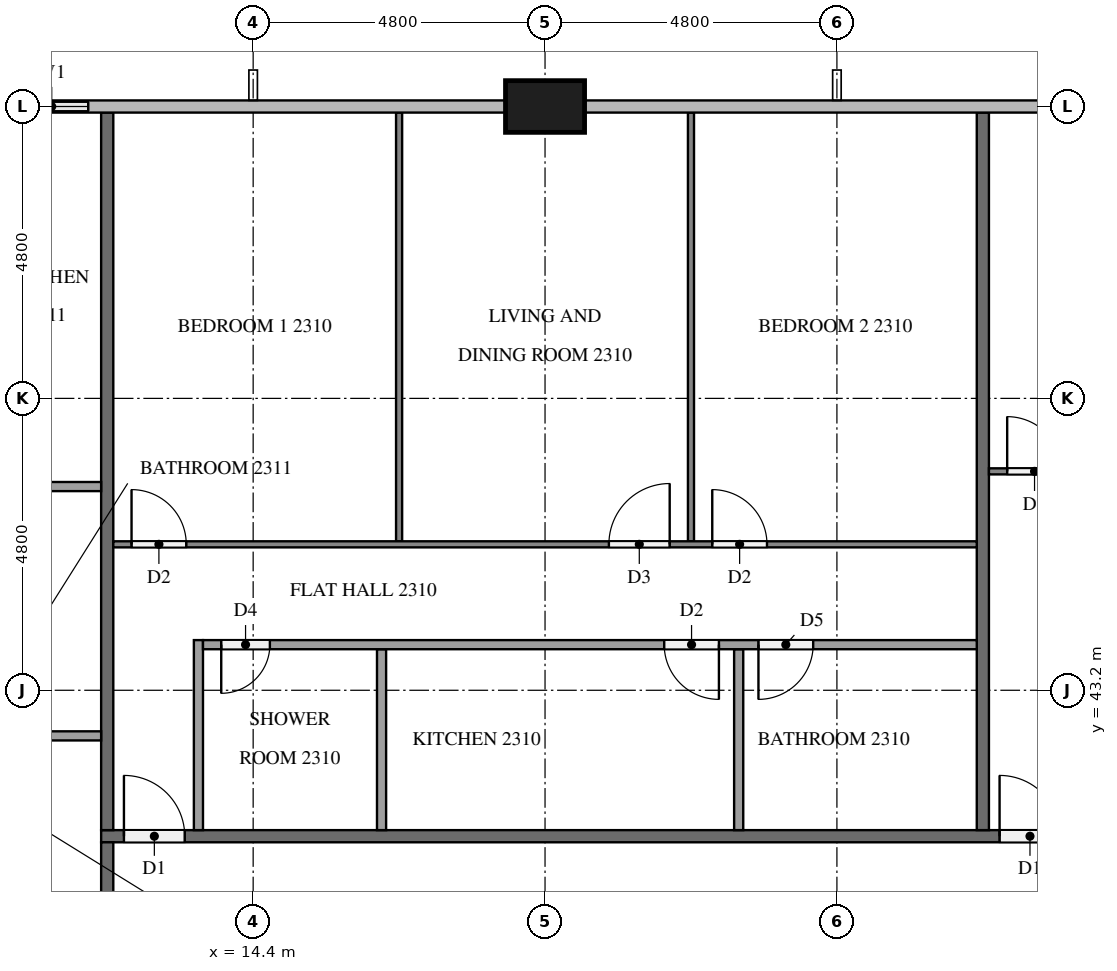
"""IFC4 building model, lengths in metres.
Left out: names, types, materials, properties, quantities, classifications, styles, units other than length and angle.
Written with IfcOpenShell. Run it as: python <this file> out.ifc"""

import sys

from ifc_helpers import new_model, si_unit, direction, frame, frame_2d, origin, origin_2d, place, context, subcontext, project, spatial, rectangle, extrude, element, fill, save


model = new_model("IFC4")
c1 = context("Model", 3, precision=1e-05, world=origin(), true_north=direction((0.0, 1.0)))
c2 = subcontext(c1, "Body", "Model", "MODEL_VIEW")
j1 = project(units=[si_unit("LENGTHUNIT", "METRE"), si_unit("PLANEANGLEUNIT", "RADIAN")], contexts=[c1])
p1 = place(None, origin())
s1 = spatial("IfcSite", under=j1, at=p1, CompositionType="ELEMENT")
p2 = place(p1, origin())
s2 = spatial("IfcBuilding", under=s1, at=p2, CompositionType="ELEMENT")
p3 = place(p2, frame((0.0, 0.0, 92.7)))
s3 = spatial("IfcBuildingStorey", under=s2, at=p3, CompositionType="ELEMENT", Elevation=92.7)
p4 = place(p3, frame((19.2, 52.8, 0.0), z_axis=(0.0, 0.0, 1.0), x_axis=(1.0, 0.0, 0.0)))
e1 = element("IfcColumn", 1, at=p4, inside=s3, PredefinedType="COLUMN", context=c2, shape_type="SweptSolid", body=[
    extrude(rectangle(XDim=1.3, YDim=0.85, at=origin_2d()), origin(), (0.0, 0.0, 1.0), 3.2),
])
p5 = place(p3, frame((12.0, 52.8, 0.0), z_axis=(0.0, 0.0, 1.0), x_axis=(-1.0, 0.0, 0.0)))
e2 = element("IfcWall", 2, at=p5, inside=s3, PredefinedType="SOLIDWALL", context=c2, shape_type="SweptSolid", body=[
    extrude(rectangle(XDim=1.825, YDim=0.15, at=frame_2d((0.913, 0.0))), origin(), (0.0, 0.0, 1.0), 3.2),
])
p6 = place(p5, frame((0.312, 0.0, 0.9)))
e3 = element("IfcOpeningElement", 3, at=p6, cuts=e2, PredefinedType="OPENING", context=c2, shape_type="SweptSolid", body=[
    extrude(rectangle(XDim=1.2, YDim=1.4, at=frame_2d((0.6, 0.7))), frame((0.0, 0.085, 0.0), z_axis=(0.0, -1.0, 0.0), x_axis=(1.0, 0.0, 0.0)), (0.0, 0.0, 1.0), 0.17),
])
p7 = place(p3, frame((11.9, 40.8, 0.0), z_axis=(0.0, 0.0, 1.0), x_axis=(1.0, 0.0, 0.0)))
e4 = element("IfcWall", 4, at=p7, inside=s3, PredefinedType="PARTITIONING", context=c2, shape_type="SweptSolid", body=[
    extrude(rectangle(XDim=38.6, YDim=0.2, at=frame_2d((19.3, 0.0))), origin(), (0.0, 0.0, 1.0), 3.2),
])
p8 = place(p7, frame((31.575, 0.0, 0.0)))
e5 = element("IfcOpeningElement", 5, at=p8, cuts=e4, PredefinedType="OPENING", context=c2, shape_type="SweptSolid", body=[
    extrude(rectangle(XDim=1.0, YDim=2.1, at=frame_2d((0.5, 1.05))), frame((0.0, 0.11, 0.0), z_axis=(0.0, -1.0, 0.0), x_axis=(1.0, 0.0, 0.0)), (0.0, 0.0, 1.0), 0.22),
])
p9 = place(p7, frame((14.775, 0.0, 0.0)))
e6 = element("IfcOpeningElement", 6, at=p9, cuts=e4, PredefinedType="OPENING", context=c2, shape_type="SweptSolid", body=[
    extrude(rectangle(XDim=1.0, YDim=2.1, at=frame_2d((0.5, 1.05))), frame((0.0, 0.11, 0.0), z_axis=(0.0, -1.0, 0.0), x_axis=(1.0, 0.0, 0.0)), (0.0, 0.0, 1.0), 0.22),
])
p10 = place(p7, frame((0.375, 0.0, 0.0)))
e7 = element("IfcOpeningElement", 7, at=p10, cuts=e4, PredefinedType="OPENING", context=c2, shape_type="SweptSolid", body=[
    extrude(rectangle(XDim=1.0, YDim=2.1, at=frame_2d((0.5, 1.05))), frame((0.0, 0.11, 0.0), z_axis=(0.0, -1.0, 0.0), x_axis=(1.0, 0.0, 0.0)), (0.0, 0.0, 1.0), 0.22),
])
p11 = place(p3, frame((12.0, 37.9, 0.0), z_axis=(0.0, 0.0, 1.0), x_axis=(0.0, 1.0, 0.0)))
e8 = element("IfcWall", 8, at=p11, inside=s3, PredefinedType="PARTITIONING", context=c2, shape_type="SweptSolid", body=[
    extrude(rectangle(XDim=2.8, YDim=0.2, at=frame_2d((1.4, 0.0))), origin(), (0.0, 0.0, 1.0), 3.2),
])
p12 = place(p11, frame((0.175, 0.0, 0.0)))
e9 = element("IfcOpeningElement", 9, at=p12, cuts=e8, PredefinedType="OPENING", context=c2, shape_type="SweptSolid", body=[
    extrude(rectangle(XDim=1.0, YDim=2.1, at=frame_2d((0.5, 1.05))), frame((0.0, 0.11, 0.0), z_axis=(0.0, -1.0, 0.0), x_axis=(1.0, 0.0, 0.0)), (0.0, 0.0, 1.0), 0.22),
])
for number, where, z_axis, x_axis in (
    (10, (26.4, 52.7, 0.0), (0.0, 0.0, 1.0), (0.0, -1.0, 0.0)),
    (11, (12.0, 52.7, 0.0), (0.0, 0.0, 1.0), (0.0, -1.0, 0.0)),
):
    element("IfcWall", number, at=place(p3, frame(where, z_axis=z_axis, x_axis=x_axis)), inside=s3, PredefinedType="PARTITIONING", context=c2, shape_type="SweptSolid", body=[
        extrude(rectangle(XDim=11.8, YDim=0.2, at=frame_2d((5.9, 0.0))), origin(), (0.0, 0.0, 1.0), 3.2),
    ])
p13 = place(p3, frame((26.5, 46.8, 0.0), z_axis=(0.0, 0.0, 1.0), x_axis=(1.0, 0.0, 0.0)))
e12 = element("IfcWall", 12, at=p13, inside=s3, PredefinedType="PARTITIONING", context=c2, shape_type="SweptSolid", body=[
    extrude(rectangle(XDim=16.6, YDim=0.1, at=frame_2d((8.3, 0.0))), origin(), (0.0, 0.0, 1.0), 3.2),
])
p14 = place(p13, frame((0.3, 0.0, 0.0)))
e13 = element("IfcOpeningElement", 13, at=p14, cuts=e12, PredefinedType="OPENING", context=c2, shape_type="SweptSolid", body=[
    extrude(rectangle(XDim=0.9, YDim=2.1, at=frame_2d((0.45, 1.05))), frame((0.0, 0.06, 0.0), z_axis=(0.0, -1.0, 0.0), x_axis=(1.0, 0.0, 0.0)), (0.0, 0.0, 1.0), 0.12),
])
p15 = place(p13, frame((8.25, 0.0, 0.0)))
e14 = element("IfcOpeningElement", 14, at=p15, cuts=e12, PredefinedType="OPENING", context=c2, shape_type="SweptSolid", body=[
    extrude(rectangle(XDim=0.9, YDim=2.1, at=frame_2d((0.45, 1.05))), frame((0.0, 0.06, 0.0), z_axis=(0.0, -1.0, 0.0), x_axis=(1.0, 0.0, 0.0)), (0.0, 0.0, 1.0), 0.12),
])
p16 = place(p13, frame((9.85, 0.0, 0.0)))
e15 = element("IfcOpeningElement", 15, at=p16, cuts=e12, PredefinedType="OPENING", context=c2, shape_type="SweptSolid", body=[
    extrude(rectangle(XDim=1.0, YDim=2.1, at=frame_2d((0.5, 1.05))), frame((0.0, 0.06, 0.0), z_axis=(0.0, -1.0, 0.0), x_axis=(1.0, 0.0, 0.0)), (0.0, 0.0, 1.0), 0.12),
])
for number, where, z_axis, x_axis in (
    (16, (16.8, 45.65, 0.0), (0.0, 0.0, 1.0), (0.0, 1.0, 0.0)),
    (17, (21.6, 45.65, 0.0), (0.0, 0.0, 1.0), (0.0, 1.0, 0.0)),
):
    element("IfcWall", number, at=place(p3, frame(where, z_axis=z_axis, x_axis=x_axis)), inside=s3, PredefinedType="PARTITIONING", context=c2, shape_type="SweptSolid", body=[
        extrude(rectangle(XDim=7.05, YDim=0.1, at=frame_2d((3.525, 0.0))), origin(), (0.0, 0.0, 1.0), 3.2),
    ])
p17 = place(p3, frame((12.1, 45.6, 0.0), z_axis=(0.0, 0.0, 1.0), x_axis=(1.0, 0.0, 0.0)))
e18 = element("IfcWall", 18, at=p17, inside=s3, PredefinedType="PARTITIONING", context=c2, shape_type="SweptSolid", body=[
    extrude(rectangle(XDim=14.2, YDim=0.1, at=frame_2d((7.1, 0.0))), origin(), (0.0, 0.0, 1.0), 3.2),
])
p18 = place(p17, frame((0.3, 0.0, 0.0)))
e19 = element("IfcOpeningElement", 19, at=p18, cuts=e18, PredefinedType="OPENING", context=c2, shape_type="SweptSolid", body=[
    extrude(rectangle(XDim=0.9, YDim=2.1, at=frame_2d((0.45, 1.05))), frame((0.0, 0.06, 0.0), z_axis=(0.0, -1.0, 0.0), x_axis=(1.0, 0.0, 0.0)), (0.0, 0.0, 1.0), 0.12),
])
p19 = place(p17, frame((8.15, 0.0, 0.0)))
e20 = element("IfcOpeningElement", 20, at=p19, cuts=e18, PredefinedType="OPENING", context=c2, shape_type="SweptSolid", body=[
    extrude(rectangle(XDim=1.0, YDim=2.1, at=frame_2d((0.5, 1.05))), frame((0.0, 0.06, 0.0), z_axis=(0.0, -1.0, 0.0), x_axis=(1.0, 0.0, 0.0)), (0.0, 0.0, 1.0), 0.12),
])
p20 = place(p17, frame((9.85, 0.0, 0.0)))
e21 = element("IfcOpeningElement", 21, at=p20, cuts=e18, PredefinedType="OPENING", context=c2, shape_type="SweptSolid", body=[
    extrude(rectangle(XDim=0.9, YDim=2.1, at=frame_2d((0.45, 1.05))), frame((0.0, 0.06, 0.0), z_axis=(0.0, -1.0, 0.0), x_axis=(1.0, 0.0, 0.0)), (0.0, 0.0, 1.0), 0.12),
])
for number, where, z_axis, x_axis in (
    (22, (16.511, 40.9, 0.0), (0.0, 0.0, 1.0), (0.0, 1.0, 0.0)),
    (23, (22.385, 40.9, 0.0), (0.0, 0.0, 1.0), (0.0, 1.0, 0.0)),
):
    element("IfcWall", number, at=place(p3, frame(where, z_axis=z_axis, x_axis=x_axis)), inside=s3, PredefinedType="PARTITIONING", context=c2, shape_type="SweptSolid", body=[
        extrude(rectangle(XDim=2.975, YDim=0.15, at=frame_2d((1.488, 0.0))), origin(), (0.0, 0.0, 1.0), 3.2),
    ])
p21 = place(p3, frame((13.5, 40.9, 0.0), z_axis=(0.0, 0.0, 1.0), x_axis=(0.0, 1.0, 0.0)))
e24 = element("IfcWall", 24, at=p21, inside=s3, PredefinedType="PARTITIONING", context=c2, shape_type="SweptSolid", body=[
    extrude(rectangle(XDim=3.125, YDim=0.15, at=frame_2d((1.562, 0.0))), origin(), (0.0, 0.0, 1.0), 3.2),
])
p22 = place(p3, frame((26.3, 43.95, 0.0), z_axis=(0.0, 0.0, 1.0), x_axis=(-1.0, 0.0, 0.0)))
e25 = element("IfcWall", 25, at=p22, inside=s3, PredefinedType="PARTITIONING", context=c2, shape_type="SweptSolid", body=[
    extrude(rectangle(XDim=12.725, YDim=0.15, at=frame_2d((6.363, 0.0))), origin(), (0.0, 0.0, 1.0), 3.2),
])
p23 = place(p22, frame((11.625, 0.0, 0.0)))
e26 = element("IfcOpeningElement", 26, at=p23, cuts=e25, PredefinedType="OPENING", context=c2, shape_type="SweptSolid", body=[
    extrude(rectangle(XDim=0.8, YDim=2.1, at=frame_2d((0.4, 1.05))), frame((0.0, 0.085, 0.0), z_axis=(0.0, -1.0, 0.0), x_axis=(1.0, 0.0, 0.0)), (0.0, 0.0, 1.0), 0.17),
])
p24 = place(p22, frame((4.24, 0.0, 0.0)))
e27 = element("IfcOpeningElement", 27, at=p24, cuts=e25, PredefinedType="OPENING", context=c2, shape_type="SweptSolid", body=[
    extrude(rectangle(XDim=0.9, YDim=2.1, at=frame_2d((0.45, 1.05))), frame((0.0, 0.085, 0.0), z_axis=(0.0, -1.0, 0.0), x_axis=(1.0, 0.0, 0.0)), (0.0, 0.0, 1.0), 0.17),
])
p25 = place(p22, frame((2.69, 0.0, 0.0)))
e28 = element("IfcOpeningElement", 28, at=p25, cuts=e25, PredefinedType="OPENING", context=c2, shape_type="SweptSolid", body=[
    extrude(rectangle(XDim=0.9, YDim=2.1, at=frame_2d((0.45, 1.05))), frame((0.0, 0.085, 0.0), z_axis=(0.0, -1.0, 0.0), x_axis=(1.0, 0.0, 0.0)), (0.0, 0.0, 1.0), 0.17),
])
for number, where, z_axis, x_axis in (
    (29, (11.9, 42.45, 0.0), (0.0, 0.0, 1.0), (-1.0, 0.0, 0.0)),
    (30, (11.9, 46.55, 0.0), (0.0, 0.0, 1.0), (-1.0, 0.0, 0.0)),
):
    element("IfcWall", number, at=place(p3, frame(where, z_axis=z_axis, x_axis=x_axis)), inside=s3, PredefinedType="PARTITIONING", context=c2, shape_type="SweptSolid", body=[
        extrude(rectangle(XDim=1.775, YDim=0.15, at=frame_2d((0.887, 0.0))), origin(), (0.0, 0.0, 1.0), 3.2),
    ])
p26 = place(p6, origin())
e31 = element("IfcWindow", 31, at=p26, inside=s3, PartitioningType="SINGLE_PANEL", PredefinedType="WINDOW", context=c2, shape_type="SweptSolid", body=[
    extrude(rectangle(XDim=1.2, YDim=1.4, at=frame_2d((0.6, 0.7))), frame((0.0, 0.03, 0.0), z_axis=(0.0, -1.0, 0.0), x_axis=(1.0, 0.0, 0.0)), (0.0, 0.0, 1.0), 0.06),
])
fill(e3, e31)
p27 = place(p9, origin())
e32 = element("IfcDoor", 32, at=p27, inside=s3, OperationType="SINGLE_SWING_LEFT", PredefinedType="DOOR", context=c2, shape_type="SweptSolid", body=[
    extrude(rectangle(XDim=1.0, YDim=2.1, at=frame_2d((0.5, 1.05))), frame((0.0, 0.025, 0.0), z_axis=(0.0, -1.0, 0.0), x_axis=(1.0, 0.0, 0.0)), (0.0, 0.0, 1.0), 0.05),
])
fill(e6, e32)
p28 = place(p10, origin())
e33 = element("IfcDoor", 33, at=p28, inside=s3, OperationType="SINGLE_SWING_LEFT", PredefinedType="DOOR", context=c2, shape_type="SweptSolid", body=[
    extrude(rectangle(XDim=1.0, YDim=2.1, at=frame_2d((0.5, 1.05))), frame((0.0, 0.025, 0.0), z_axis=(0.0, -1.0, 0.0), x_axis=(1.0, 0.0, 0.0)), (0.0, 0.0, 1.0), 0.05),
])
fill(e7, e33)
p29 = place(p14, origin())
e34 = element("IfcDoor", 34, at=p29, inside=s3, OperationType="SINGLE_SWING_LEFT", PredefinedType="DOOR", context=c2, shape_type="SweptSolid", body=[
    extrude(rectangle(XDim=0.9, YDim=2.1, at=frame_2d((0.45, 1.05))), frame((0.0, 0.025, 0.0), z_axis=(0.0, -1.0, 0.0), x_axis=(1.0, 0.0, 0.0)), (0.0, 0.0, 1.0), 0.05),
])
fill(e13, e34)
p30 = place(p18, origin())
e35 = element("IfcDoor", 35, at=p30, inside=s3, OperationType="SINGLE_SWING_LEFT", PredefinedType="DOOR", context=c2, shape_type="SweptSolid", body=[
    extrude(rectangle(XDim=0.9, YDim=2.1, at=frame_2d((0.45, 1.05))), frame((0.0, 0.025, 0.0), z_axis=(0.0, -1.0, 0.0), x_axis=(1.0, 0.0, 0.0)), (0.0, 0.0, 1.0), 0.05),
])
fill(e19, e35)
p31 = place(p19, origin())
e36 = element("IfcDoor", 36, at=p31, inside=s3, OperationType="SINGLE_SWING_RIGHT", PredefinedType="DOOR", context=c2, shape_type="SweptSolid", body=[
    extrude(rectangle(XDim=1.0, YDim=2.1, at=frame_2d((0.5, 1.05))), frame((0.0, 0.025, 0.0), z_axis=(0.0, -1.0, 0.0), x_axis=(1.0, 0.0, 0.0)), (0.0, 0.0, 1.0), 0.05),
])
fill(e20, e36)
p32 = place(p20, origin())
e37 = element("IfcDoor", 37, at=p32, inside=s3, OperationType="SINGLE_SWING_LEFT", PredefinedType="DOOR", context=c2, shape_type="SweptSolid", body=[
    extrude(rectangle(XDim=0.9, YDim=2.1, at=frame_2d((0.45, 1.05))), frame((0.0, 0.025, 0.0), z_axis=(0.0, -1.0, 0.0), x_axis=(1.0, 0.0, 0.0)), (0.0, 0.0, 1.0), 0.05),
])
fill(e21, e37)
p33 = place(p23, origin())
e38 = element("IfcDoor", 38, at=p33, inside=s3, OperationType="SINGLE_SWING_RIGHT", PredefinedType="DOOR", context=c2, shape_type="SweptSolid", body=[
    extrude(rectangle(XDim=0.8, YDim=2.1, at=frame_2d((0.4, 1.05))), frame((0.0, 0.025, 0.0), z_axis=(0.0, -1.0, 0.0), x_axis=(1.0, 0.0, 0.0)), (0.0, 0.0, 1.0), 0.05),
])
fill(e26, e38)
p34 = place(p24, origin())
e39 = element("IfcDoor", 39, at=p34, inside=s3, OperationType="SINGLE_SWING_LEFT", PredefinedType="DOOR", context=c2, shape_type="SweptSolid", body=[
    extrude(rectangle(XDim=0.9, YDim=2.1, at=frame_2d((0.45, 1.05))), frame((0.0, 0.025, 0.0), z_axis=(0.0, -1.0, 0.0), x_axis=(1.0, 0.0, 0.0)), (0.0, 0.0, 1.0), 0.05),
])
fill(e27, e39)
p35 = place(p25, origin())
e40 = element("IfcDoor", 40, at=p35, inside=s3, OperationType="SINGLE_SWING_RIGHT", PredefinedType="DOOR", context=c2, shape_type="SweptSolid", body=[
    extrude(rectangle(XDim=0.9, YDim=2.1, at=frame_2d((0.45, 1.05))), frame((0.0, 0.025, 0.0), z_axis=(0.0, -1.0, 0.0), x_axis=(1.0, 0.0, 0.0)), (0.0, 0.0, 1.0), 0.05),
])
fill(e28, e40)
save(model, sys.argv[1])
